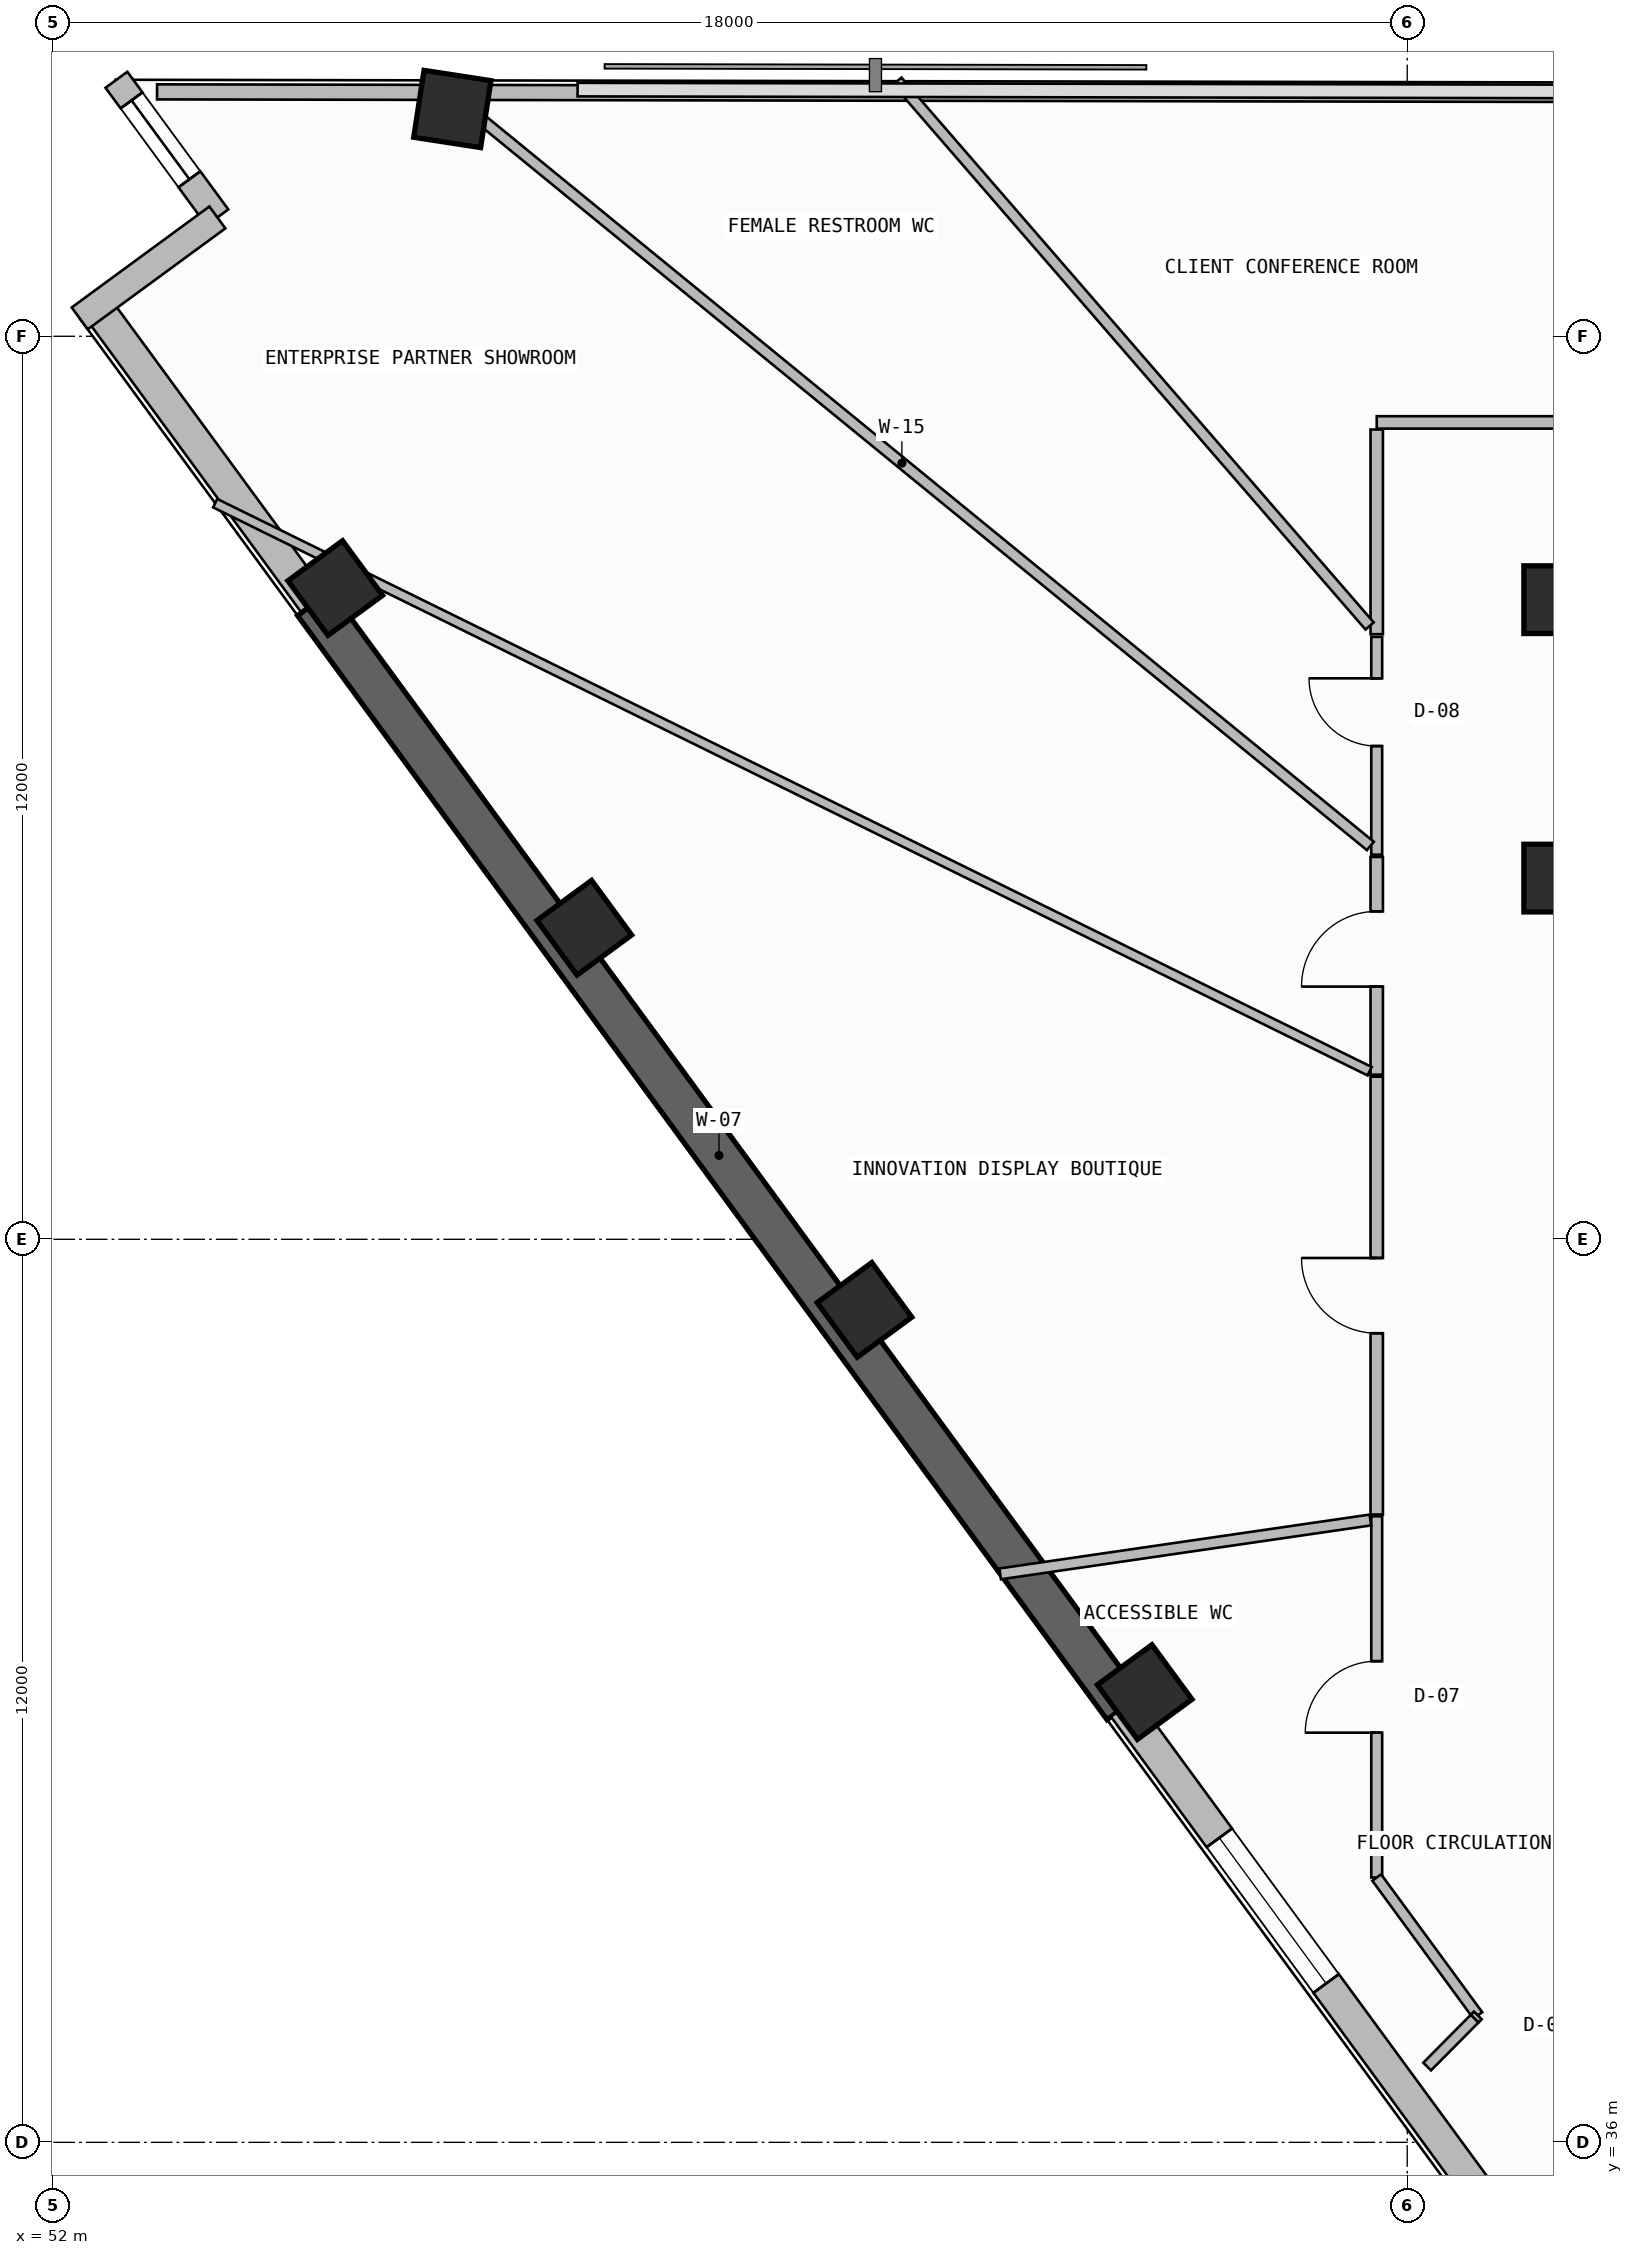
"""IFC4 building model, lengths in metres.
Left out: names, types, materials, properties, quantities, classifications, styles, units other than length and angle.
Written with IfcOpenShell. Run it as: python <this file> out.ifc"""

import sys

from ifc_helpers import new_model, si_unit, direction, frame, frame_2d, origin, origin_2d, place, context, subcontext, project, spatial, rectangle, extrude, element, fill, save


model = new_model("IFC4")
c1 = context("Model", 3, precision=1e-05, world=origin(), true_north=direction((0.0, 1.0)))
c2 = subcontext(c1, "Body", "Model", "MODEL_VIEW")
j1 = project(units=[si_unit("LENGTHUNIT", "METRE"), si_unit("PLANEANGLEUNIT", "RADIAN")], contexts=[c1])
p1 = place(None, origin())
s1 = spatial("IfcSite", under=j1, at=p1, CompositionType="ELEMENT")
p2 = place(p1, origin())
s2 = spatial("IfcBuilding", under=s1, at=p2, CompositionType="ELEMENT")
p3 = place(p2, frame((0.0, 0.0, 243.14)))
s3 = spatial("IfcBuildingStorey", under=s2, at=p3, CompositionType="ELEMENT", Elevation=243.14)
for number, where, z_axis, x_axis in (
    (1, (72.0, 52.8, 0.0), (0.0, 0.0, 1.0), (1.0, 0.0, 0.0)),
    (2, (72.0, 56.5, 0.0), (0.0, 0.0, 1.0), (1.0, 0.0, 0.0)),
    (3, (57.309, 63.021, 0.0), (0.0, 0.0, 1.0), (0.152, 0.988, 0.0)),
    (4, (55.753, 56.654, 0.0), (0.0, 0.0, 1.0), (-0.591, 0.806, 0.0)),
    (5, (59.063, 52.14, 0.0), (0.0, 0.0, 1.0), (-0.591, 0.806, 0.0)),
    (6, (62.787, 47.062, 0.0), (0.0, 0.0, 1.0), (-0.591, 0.806, 0.0)),
    (7, (66.51, 41.983, 0.0), (0.0, 0.0, 1.0), (-0.591, 0.806, 0.0)),
):
    element("IfcColumn", number, at=place(p3, frame(where, z_axis=z_axis, x_axis=x_axis)), inside=s3, PredefinedType="COLUMN", context=c2, shape_type="SweptSolid", body=[
        extrude(rectangle(XDim=0.9, YDim=0.9, at=origin_2d()), origin(), (0.0, 0.0, 1.0), 3.52),
    ])
p4 = place(p3, frame((52.579, 60.4, 0.0), z_axis=(0.0, 0.0, 1.0), x_axis=(0.591311800505, -0.806443026248, 0.0)))
e8 = element("IfcWall", 8, at=p4, inside=s3, PredefinedType="SOLIDWALL", context=c2, shape_type="SweptSolid", body=[
    extrude(rectangle(XDim=4.898, YDim=0.42, at=frame_2d((2.449, 0.0))), origin(), (0.0, 0.0, 1.0), 2.645),
])
p5 = place(p3, frame((55.475, 56.45, -0.26), z_axis=(0.0, 0.0, 1.0), x_axis=(0.591309555876, -0.806444672082, 0.0)))
e9 = element("IfcWall", 9, at=p5, inside=s3, PredefinedType="SHEAR", context=c2, shape_type="SweptSolid", body=[
    extrude(rectangle(XDim=18.192, YDim=0.55, at=frame_2d((9.096, 0.0))), origin(), (0.0, 0.0, 1.0), 3.52),
])
p6 = place(p3, frame((66.232, 41.779, 0.0), z_axis=(0.0, 0.0, 1.0), x_axis=(0.591309008949, -0.806445073105, 0.0)))
e10 = element("IfcWall", 10, at=p6, inside=s3, PredefinedType="SOLIDWALL", context=c2, shape_type="SweptSolid", body=[
    extrude(rectangle(XDim=8.908, YDim=0.42, at=frame_2d((4.454, 0.0))), origin(), (0.0, 0.0, 1.0), 2.645),
])
p7 = place(p6, frame((2.149, 0.0, 1.1)))
e11 = element("IfcOpeningElement", 11, at=p7, cuts=e10, PredefinedType="OPENING", context=c2, shape_type="SweptSolid", body=[
    extrude(rectangle(XDim=2.4, YDim=1.2, at=frame_2d((1.2, 0.6))), frame((0.0, 0.22, 0.0), z_axis=(0.0, -1.0, 0.0), x_axis=(1.0, 0.0, 0.0)), (0.0, 0.0, 1.0), 0.44),
])
p8 = place(p3, frame((52.845, 63.409, 0.0), z_axis=(0.0, 0.0, 1.0), x_axis=(0.591251685745, -0.806487101015, 0.0)))
e12 = element("IfcWall", 12, at=p8, inside=s3, PredefinedType="SOLIDWALL", context=c2, shape_type="SweptSolid", body=[
    extrude(rectangle(XDim=2.269, YDim=0.36, at=frame_2d((1.134, 0.0))), origin(), (0.0, 0.0, 1.0), 3.26),
])
p9 = place(p8, frame((0.34, 0.0, 0.45)))
e13 = element("IfcOpeningElement", 13, at=p9, cuts=e12, PredefinedType="OPENING", context=c2, shape_type="SweptSolid", body=[
    extrude(rectangle(XDim=1.3, YDim=2.4, at=frame_2d((0.65, 1.2))), frame((0.0, 0.19, 0.0), z_axis=(0.0, -1.0, 0.0), x_axis=(1.0, 0.0, 0.0)), (0.0, 0.0, 1.0), 0.38),
])
p10 = place(p3, frame((54.187, 61.579, 0.0), z_axis=(0.0, 0.0, 1.0), x_axis=(-0.806449475274, -0.591303005092, 0.0)))
e14 = element("IfcWall", 14, at=p10, inside=s3, PredefinedType="SOLIDWALL", context=c2, shape_type="SweptSolid", body=[
    extrude(rectangle(XDim=2.268, YDim=0.36, at=frame_2d((1.134, 0.0))), origin(), (0.0, 0.0, 1.0), 3.26),
])
p11 = place(p3, frame((83.332, 63.193, 0.0), z_axis=(0.0, 0.0, 1.0), x_axis=(-0.999998363757, 0.001809000383, 0.0)))
e15 = element("IfcWall", 15, at=p11, inside=s3, PredefinedType="PARAPET", context=c2, shape_type="SweptSolid", body=[
    extrude(rectangle(XDim=25.777, YDim=0.2, at=frame_2d((12.889, 0.0))), origin(), (0.0, 0.0, 1.0), 1.15),
])
p12 = place(p3, frame((57.064, 63.241, 0.0), z_axis=(0.0, 0.0, 1.0), x_axis=(-0.999998274159, 0.001857869529, 0.0)))
e16 = element("IfcWall", 16, at=p12, inside=s3, PredefinedType="PARAPET", context=c2, shape_type="SweptSolid", body=[
    extrude(rectangle(XDim=3.679, YDim=0.2, at=frame_2d((1.84, 0.0))), origin(), (0.0, 0.0, 1.0), 1.15),
])
p13 = place(p3, frame((69.594, 44.319, 0.0), z_axis=(0.0, 0.0, 1.0), x_axis=(0.0, -1.0, 0.0)))
e17 = element("IfcWall", 17, at=p13, inside=s3, PredefinedType="PARTITIONING", context=c2, shape_type="SweptSolid", body=[
    extrude(rectangle(XDim=4.8, YDim=0.145, at=frame_2d((2.4, 0.0))), origin(), (0.0, 0.0, 1.0), 3.26),
])
p14 = place(p13, frame((1.925, 0.0, 0.0)))
e18 = element("IfcOpeningElement", 18, at=p14, cuts=e17, PredefinedType="OPENING", context=c2, shape_type="SweptSolid", body=[
    extrude(rectangle(XDim=0.95, YDim=2.15, at=frame_2d((0.475, 1.075))), frame((0.0, 0.083, 0.0), z_axis=(0.0, -1.0, 0.0), x_axis=(1.0, 0.0, 0.0)), (0.0, 0.0, 1.0), 0.165),
])
p15 = place(p3, frame((69.594, 39.519, 0.0), z_axis=(0.0, 0.0, 1.0), x_axis=(0.591405579401, -0.806374255946, 0.0)))
e19 = element("IfcWall", 19, at=p15, inside=s3, PredefinedType="PARTITIONING", context=c2, shape_type="SweptSolid", body=[
    extrude(rectangle(XDim=2.272, YDim=0.145, at=frame_2d((1.136, 0.0))), origin(), (0.0, 0.0, 1.0), 3.26),
])
p16 = place(p3, frame((70.938, 37.687, 0.0), z_axis=(0.0, 0.0, 1.0), x_axis=(-0.705100816582, -0.709107071221, 0.0)))
e20 = element("IfcWall", 20, at=p16, inside=s3, PredefinedType="PARTITIONING", context=c2, shape_type="SweptSolid", body=[
    extrude(rectangle(XDim=0.061, YDim=0.145, at=frame_2d((0.031, 0.0))), origin(), (0.0, 0.0, 1.0), 3.26),
])
p17 = place(p3, frame((64.59, 43.554, 0.0), z_axis=(0.0, 0.0, 1.0), x_axis=(0.989573845163, 0.144026403725, 0.0)))
e21 = element("IfcWall", 21, at=p17, inside=s3, PredefinedType="PARTITIONING", context=c2, shape_type="SweptSolid", body=[
    extrude(rectangle(XDim=4.972, YDim=0.145, at=frame_2d((2.486, 0.0))), origin(), (0.0, 0.0, 1.0), 2.645),
])
p18 = place(p3, frame((77.35, 58.855, 0.0), z_axis=(0.0, 0.0, 1.0), x_axis=(-1.0, 0.0, 0.0)))
e22 = element("IfcWall", 22, at=p18, inside=s3, PredefinedType="PARTITIONING", context=c2, shape_type="SweptSolid", body=[
    extrude(rectangle(XDim=7.756, YDim=0.165, at=frame_2d((3.878, 0.0))), origin(), (0.0, 0.0, 1.0), 3.26),
])
p19 = place(p18, frame((1.598, 0.0, 0.0)))
e23 = element("IfcOpeningElement", 23, at=p19, cuts=e22, PredefinedType="OPENING", context=c2, shape_type="SweptSolid", body=[
    extrude(rectangle(XDim=1.0, YDim=2.2, at=frame_2d((0.5, 1.1))), frame((0.0, 0.093, 0.0), z_axis=(0.0, -1.0, 0.0), x_axis=(1.0, 0.0, 0.0)), (0.0, 0.0, 1.0), 0.185),
])
p20 = place(p3, frame((69.594, 58.761, 0.0), z_axis=(0.0, 0.0, 1.0), x_axis=(0.0, -1.0, 0.0)))
e24 = element("IfcWall", 24, at=p20, inside=s3, PredefinedType="PARTITIONING", context=c2, shape_type="SweptSolid", body=[
    extrude(rectangle(XDim=2.72, YDim=0.165, at=frame_2d((1.36, 0.0))), origin(), (0.0, 0.0, 1.0), 2.745),
])
p21 = place(p3, frame((69.5, 56.15, 0.0), z_axis=(0.0, 0.0, 1.0), x_axis=(-0.655072155805, 0.755566324481, 0.0)))
e25 = element("IfcWall", 25, at=p21, inside=s3, PredefinedType="PARTITIONING", context=c2, shape_type="SweptSolid", body=[
    extrude(rectangle(XDim=9.582, YDim=0.145, at=frame_2d((4.791, 0.0))), origin(), (0.0, 0.0, 1.0), 2.745),
])
p22 = place(p3, frame((69.594, 56.005, 0.0), z_axis=(0.0, 0.0, 1.0), x_axis=(0.0, -1.0, 0.0)))
e26 = element("IfcWall", 26, at=p22, inside=s3, PredefinedType="PARTITIONING", context=c2, shape_type="SweptSolid", body=[
    extrude(rectangle(XDim=2.893, YDim=0.145, at=frame_2d((1.447, 0.0))), origin(), (0.0, 0.0, 1.0), 3.26),
])
p23 = place(p22, frame((0.551, 0.0, 0.0)))
e27 = element("IfcOpeningElement", 27, at=p23, cuts=e26, PredefinedType="OPENING", context=c2, shape_type="SweptSolid", body=[
    extrude(rectangle(XDim=0.9, YDim=2.1, at=frame_2d((0.45, 1.05))), frame((0.0, 0.083, 0.0), z_axis=(0.0, -1.0, 0.0), x_axis=(1.0, 0.0, 0.0)), (0.0, 0.0, 1.0), 0.165),
])
p24 = place(p3, frame((69.51, 53.227, 0.0), z_axis=(0.0, 0.0, 1.0), x_axis=(-0.77440491792, 0.632690305838, 0.0)))
e28 = element("IfcWall", 28, at=p24, inside=s3, PredefinedType="PARTITIONING", context=c2, shape_type="SweptSolid", body=[
    extrude(rectangle(XDim=16.08, YDim=0.145, at=frame_2d((8.04, 0.0))), origin(), (0.0, 0.0, 1.0), 2.645),
])
p25 = place(p3, frame((69.594, 53.081, 0.0), z_axis=(0.0, 0.0, 1.0), x_axis=(0.0, -1.0, 0.0)))
e29 = element("IfcWall", 29, at=p25, inside=s3, PredefinedType="PARTITIONING", context=c2, shape_type="SweptSolid", body=[
    extrude(rectangle(XDim=2.894, YDim=0.165, at=frame_2d((1.447, 0.0))), origin(), (0.0, 0.0, 1.0), 2.745),
])
p26 = place(p25, frame((0.723, 0.0, 0.0)))
e30 = element("IfcOpeningElement", 30, at=p26, cuts=e29, PredefinedType="OPENING", context=c2, shape_type="SweptSolid", body=[
    extrude(rectangle(XDim=1.0, YDim=2.2, at=frame_2d((0.5, 1.1))), frame((0.0, 0.093, 0.0), z_axis=(0.0, -1.0, 0.0), x_axis=(1.0, 0.0, 0.0)), (0.0, 0.0, 1.0), 0.185),
])
p27 = place(p3, frame((69.5, 50.234, 0.0), z_axis=(0.0, 0.0, 1.0), x_axis=(-0.897284327813, 0.441453094972, 0.0)))
e31 = element("IfcWall", 31, at=p27, inside=s3, PredefinedType="PARTITIONING", context=c2, shape_type="SweptSolid", body=[
    extrude(rectangle(XDim=17.099, YDim=0.125, at=frame_2d((8.549, 0.0))), origin(), (0.0, 0.0, 1.0), 2.645),
])
p28 = place(p3, frame((69.594, 50.161, 0.0), z_axis=(0.0, 0.0, 1.0), x_axis=(0.0, -1.0, 0.0)))
e32 = element("IfcWall", 32, at=p28, inside=s3, PredefinedType="PARTITIONING", context=c2, shape_type="SweptSolid", body=[
    extrude(rectangle(XDim=5.818, YDim=0.165, at=frame_2d((2.909, 0.0))), origin(), (0.0, 0.0, 1.0), 3.26),
])
p29 = place(p28, frame((2.409, 0.0, 0.0)))
e33 = element("IfcOpeningElement", 33, at=p29, cuts=e32, PredefinedType="OPENING", context=c2, shape_type="SweptSolid", body=[
    extrude(rectangle(XDim=1.0, YDim=2.2, at=frame_2d((0.5, 1.1))), frame((0.0, 0.093, 0.0), z_axis=(0.0, -1.0, 0.0), x_axis=(1.0, 0.0, 0.0)), (0.0, 0.0, 1.0), 0.185),
])
p30 = place(p3, frame((70.896, 37.643, 0.0), z_axis=(0.0, 0.0, 1.0), x_axis=(-0.703965648178, -0.710234022126, 0.0)))
e34 = element("IfcWall", 34, at=p30, inside=s3, PredefinedType="PARTITIONING", context=c2, shape_type="SweptSolid", body=[
    extrude(rectangle(XDim=0.896, YDim=0.145, at=frame_2d((0.448, 0.0))), origin(), (0.0, 0.0, 1.0), 3.26),
])
p31 = place(p7, origin())
e35 = element("IfcWindow", 35, at=p31, inside=s3, PartitioningType="SINGLE_PANEL", PredefinedType="WINDOW", context=c2, shape_type="SweptSolid", body=[
    extrude(rectangle(XDim=2.4, YDim=1.2, at=frame_2d((1.2, 0.6))), frame((0.0, 0.03, 0.0), z_axis=(0.0, -1.0, 0.0), x_axis=(1.0, 0.0, 0.0)), (0.0, 0.0, 1.0), 0.06),
])
fill(e11, e35)
p32 = place(p9, origin())
e36 = element("IfcWindow", 36, at=p32, inside=s3, PartitioningType="SINGLE_PANEL", PredefinedType="WINDOW", context=c2, shape_type="SweptSolid", body=[
    extrude(rectangle(XDim=1.3, YDim=2.4, at=frame_2d((0.65, 1.2))), frame((0.0, 0.03, 0.0), z_axis=(0.0, -1.0, 0.0), x_axis=(1.0, 0.0, 0.0)), (0.0, 0.0, 1.0), 0.06),
])
fill(e13, e36)
p33 = place(p14, frame((0.95, 0.0, 0.0), z_axis=(0.0, 0.0, 1.0), x_axis=(-1.0, 0.0, 0.0)))
e37 = element("IfcDoor", 37, at=p33, inside=s3, OperationType="SINGLE_SWING_LEFT", PredefinedType="DOOR", context=c2, shape_type="SweptSolid", body=[
    extrude(rectangle(XDim=0.95, YDim=2.15, at=frame_2d((0.475, 1.075))), frame((0.0, 0.025, 0.0), z_axis=(0.0, -1.0, 0.0), x_axis=(1.0, 0.0, 0.0)), (0.0, 0.0, 1.0), 0.05),
])
fill(e18, e37)
p34 = place(p23, frame((0.9, 0.0, 0.0), z_axis=(0.0, 0.0, 1.0), x_axis=(-1.0, 0.0, 0.0)))
e38 = element("IfcDoor", 38, at=p34, inside=s3, OperationType="SINGLE_SWING_RIGHT", PredefinedType="DOOR", context=c2, shape_type="SweptSolid", body=[
    extrude(rectangle(XDim=0.9, YDim=2.1, at=frame_2d((0.45, 1.05))), frame((0.0, 0.025, 0.0), z_axis=(0.0, -1.0, 0.0), x_axis=(1.0, 0.0, 0.0)), (0.0, 0.0, 1.0), 0.05),
])
fill(e27, e38)
p35 = place(p26, frame((1.0, 0.0, 0.0), z_axis=(0.0, 0.0, 1.0), x_axis=(-1.0, 0.0, 0.0)))
e39 = element("IfcDoor", 39, at=p35, inside=s3, OperationType="SINGLE_SWING_LEFT", PredefinedType="DOOR", context=c2, shape_type="SweptSolid", body=[
    extrude(rectangle(XDim=1.0, YDim=2.2, at=frame_2d((0.5, 1.1))), frame((0.0, 0.025, 0.0), z_axis=(0.0, -1.0, 0.0), x_axis=(1.0, 0.0, 0.0)), (0.0, 0.0, 1.0), 0.05),
])
fill(e30, e39)
p36 = place(p29, frame((1.0, 0.0, 0.0), z_axis=(0.0, 0.0, 1.0), x_axis=(-1.0, 0.0, 0.0)))
e40 = element("IfcDoor", 40, at=p36, inside=s3, OperationType="SINGLE_SWING_RIGHT", PredefinedType="DOOR", context=c2, shape_type="SweptSolid", body=[
    extrude(rectangle(XDim=1.0, YDim=2.2, at=frame_2d((0.5, 1.1))), frame((0.0, 0.025, 0.0), z_axis=(0.0, -1.0, 0.0), x_axis=(1.0, 0.0, 0.0)), (0.0, 0.0, 1.0), 0.05),
])
fill(e33, e40)
save(model, sys.argv[1])
